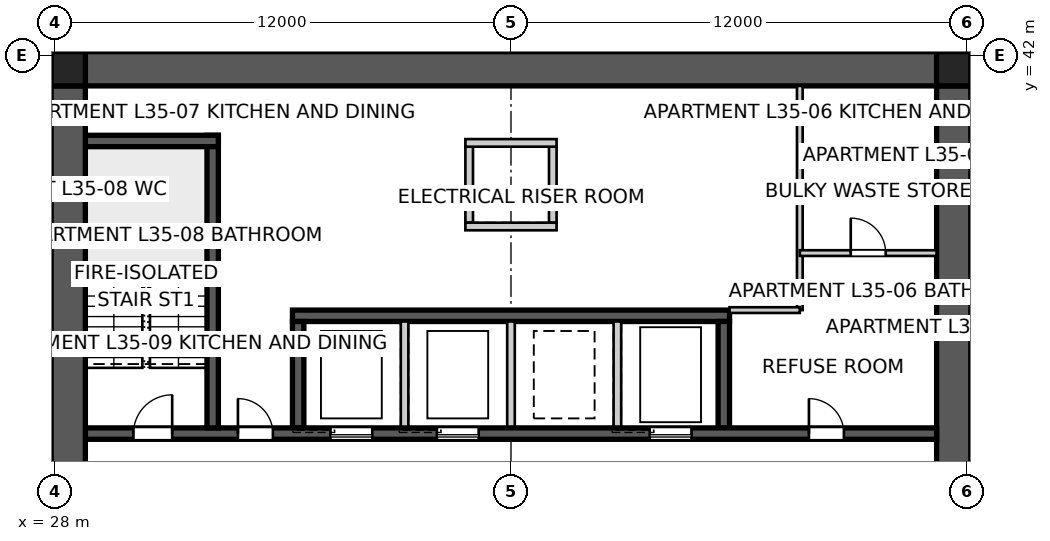
"""IFC4 building model, lengths in metres.
Left out: names, types, materials, properties, quantities, classifications, styles, units other than length and angle.
Written with IfcOpenShell. Run it as: python <this file> out.ifc"""

import sys

from ifc_helpers import new_model, si_unit, direction, frame, frame_2d, origin, origin_2d, place, context, subcontext, project, spatial, polyline, rectangle, outline, extrude, element, fill, save


model = new_model("IFC4")
c1 = context("Model", 3, precision=1e-05, world=origin(), true_north=direction((0.0, 1.0)))
c2 = subcontext(c1, "Body", "Model", "MODEL_VIEW")
j1 = project(units=[si_unit("LENGTHUNIT", "METRE"), si_unit("PLANEANGLEUNIT", "RADIAN")], contexts=[c1])
p1 = place(None, origin())
s1 = spatial("IfcSite", under=j1, at=p1, CompositionType="ELEMENT")
p2 = place(p1, origin())
s2 = spatial("IfcBuilding", under=s1, at=p2, CompositionType="ELEMENT")
p3 = place(p2, frame((0.0, 0.0, 128.6)))
s3 = spatial("IfcBuildingStorey", under=s2, at=p3, CompositionType="ELEMENT", Elevation=128.6)
p4 = place(p3, frame((28.8, 41.65, 0.0), z_axis=(0.0, 0.0, 1.0), x_axis=(1.0, 0.0, 0.0)))
e1 = element("IfcWall", 1, at=p4, inside=s3, PredefinedType="SHEAR", context=c2, shape_type="SweptSolid", body=[
    extrude(outline(polyline([(0.0, -0.45), (22.4, -0.45), (22.4, -0.025), (22.85, -0.025), (22.85, 0.025), (22.4, 0.025), (22.4, 0.45), (0.0, 0.45), (0.0, 0.025), (-0.45, 0.025), (-0.45, -0.025), (0.0, -0.025), (0.0, -0.45)])), origin(), (0.0, 0.0, 1.0), 3.4),
])
p5 = place(p3, frame((51.65, 18.8, 0.0), z_axis=(0.0, 0.0, 1.0), x_axis=(0.0, 1.0, 0.0)))
e2 = element("IfcWall", 2, at=p5, inside=s3, PredefinedType="SHEAR", context=c2, shape_type="SweptSolid", body=[
    extrude(outline(polyline([(0.0, -0.45), (22.4, -0.45), (22.4, -0.025), (22.85, -0.025), (22.85, 0.025), (22.4, 0.025), (22.4, 0.45), (0.0, 0.45), (0.0, 0.025), (-0.45, 0.025), (-0.45, -0.025), (0.0, -0.025), (0.0, -0.45)])), origin(), (0.0, 0.0, 1.0), 3.4),
])
p6 = place(p5, frame((11.14, 0.0, 0.0)))
e3 = element("IfcOpeningElement", 3, at=p6, cuts=e2, PredefinedType="OPENING", context=c2, shape_type="SweptSolid", body=[
    extrude(rectangle(XDim=1.02, YDim=2.4, at=frame_2d((0.51, 1.2))), frame((0.0, 0.46, 0.0), z_axis=(0.0, -1.0, 0.0), x_axis=(1.0, 0.0, 0.0)), (0.0, 0.0, 1.0), 0.92),
])
p7 = place(p3, frame((28.35, 41.2, 0.0), z_axis=(0.0, 0.0, 1.0), x_axis=(0.0, -1.0, 0.0)))
e4 = element("IfcWall", 4, at=p7, inside=s3, PredefinedType="SHEAR", context=c2, shape_type="SweptSolid", body=[
    extrude(outline(polyline([(0.0, -0.45), (22.4, -0.45), (22.4, -0.025), (22.85, -0.025), (22.85, 0.025), (22.4, 0.025), (22.4, 0.45), (0.0, 0.45), (0.0, 0.025), (-0.45, 0.025), (-0.45, -0.025), (0.0, -0.025), (0.0, -0.45)])), origin(), (0.0, 0.0, 1.0), 3.4),
])
p8 = place(p7, frame((11.14, 0.0, 0.0)))
e5 = element("IfcOpeningElement", 5, at=p8, cuts=e4, PredefinedType="OPENING", context=c2, shape_type="SweptSolid", body=[
    extrude(rectangle(XDim=1.02, YDim=2.4, at=frame_2d((0.51, 1.2))), frame((0.0, 0.46, 0.0), z_axis=(0.0, -1.0, 0.0), x_axis=(1.0, 0.0, 0.0)), (0.0, 0.0, 1.0), 0.92),
])
p9 = place(p3, frame((28.8, 32.05, 0.0), z_axis=(0.0, 0.0, 1.0), x_axis=(1.0, 0.0, 0.0)))
e6 = element("IfcWall", 6, at=p9, inside=s3, PredefinedType="SHEAR", context=c2, shape_type="SweptSolid", body=[
    extrude(rectangle(XDim=22.4, YDim=0.3, at=frame_2d((11.2, 0.0))), origin(), (0.0, 0.0, 1.0), 3.4),
])
p10 = place(p9, frame((19.04, 0.0, 0.0)))
e7 = element("IfcOpeningElement", 7, at=p10, cuts=e6, PredefinedType="OPENING", context=c2, shape_type="SweptSolid", body=[
    extrude(rectangle(XDim=0.92, YDim=2.1, at=frame_2d((0.46, 1.05))), frame((0.0, 0.16, 0.0), z_axis=(0.0, -1.0, 0.0), x_axis=(1.0, 0.0, 0.0)), (0.0, 0.0, 1.0), 0.32),
])
p11 = place(p9, frame((1.265, 0.0, 0.0)))
e8 = element("IfcOpeningElement", 8, at=p11, cuts=e6, PredefinedType="OPENING", context=c2, shape_type="SweptSolid", body=[
    extrude(rectangle(XDim=1.02, YDim=2.1, at=frame_2d((0.51, 1.05))), frame((0.0, 0.16, 0.0), z_axis=(0.0, -1.0, 0.0), x_axis=(1.0, 0.0, 0.0)), (0.0, 0.0, 1.0), 0.32),
])
p12 = place(p9, frame((4.015, 0.0, 0.0)))
e9 = element("IfcOpeningElement", 9, at=p12, cuts=e6, PredefinedType="OPENING", context=c2, shape_type="SweptSolid", body=[
    extrude(rectangle(XDim=0.92, YDim=2.1, at=frame_2d((0.46, 1.05))), frame((0.0, 0.16, 0.0), z_axis=(0.0, -1.0, 0.0), x_axis=(1.0, 0.0, 0.0)), (0.0, 0.0, 1.0), 0.32),
])
p13 = place(p9, frame((6.45, 0.0, 0.0)))
e10 = element("IfcOpeningElement", 10, at=p13, cuts=e6, PredefinedType="OPENING", context=c2, shape_type="SweptSolid", body=[
    extrude(rectangle(XDim=1.1, YDim=2.1, at=frame_2d((0.55, 1.05))), frame((0.0, 0.16, 0.0), z_axis=(0.0, -1.0, 0.0), x_axis=(1.0, 0.0, 0.0)), (0.0, 0.0, 1.0), 0.32),
])
p14 = place(p9, frame((9.25, 0.0, 0.0)))
e11 = element("IfcOpeningElement", 11, at=p14, cuts=e6, PredefinedType="OPENING", context=c2, shape_type="SweptSolid", body=[
    extrude(rectangle(XDim=1.1, YDim=2.1, at=frame_2d((0.55, 1.05))), frame((0.0, 0.16, 0.0), z_axis=(0.0, -1.0, 0.0), x_axis=(1.0, 0.0, 0.0)), (0.0, 0.0, 1.0), 0.32),
])
p15 = place(p9, frame((14.85, 0.0, 0.0)))
e12 = element("IfcOpeningElement", 12, at=p15, cuts=e6, PredefinedType="OPENING", context=c2, shape_type="SweptSolid", body=[
    extrude(rectangle(XDim=1.1, YDim=2.1, at=frame_2d((0.55, 1.05))), frame((0.0, 0.16, 0.0), z_axis=(0.0, -1.0, 0.0), x_axis=(1.0, 0.0, 0.0)), (0.0, 0.0, 1.0), 0.32),
])
p16 = place(p3, frame((34.25, 35.15, 0.0), z_axis=(0.0, 0.0, 1.0), x_axis=(1.0, 0.0, 0.0)))
e13 = element("IfcWall", 13, at=p16, inside=s3, PredefinedType="SHEAR", context=c2, shape_type="SweptSolid", body=[
    extrude(rectangle(XDim=11.5, YDim=0.3, at=frame_2d((5.75, 0.0))), origin(), (0.0, 0.0, 1.0), 3.4),
])
p17 = place(p3, frame((34.4, 32.2, 0.0), z_axis=(0.0, 0.0, 1.0), x_axis=(0.0, 1.0, 0.0)))
e14 = element("IfcWall", 14, at=p17, inside=s3, PredefinedType="SHEAR", context=c2, shape_type="SweptSolid", body=[
    extrude(rectangle(XDim=2.8, YDim=0.3, at=frame_2d((1.4, 0.0))), origin(), (0.0, 0.0, 1.0), 3.4),
])
for number, where, z_axis, x_axis in (
    (15, (37.2, 32.2, 0.0), (0.0, 0.0, 1.0), (0.0, 1.0, 0.0)),
    (16, (40.0, 32.2, 0.0), (0.0, 0.0, 1.0), (0.0, 1.0, 0.0)),
    (17, (42.8, 32.2, 0.0), (0.0, 0.0, 1.0), (0.0, 1.0, 0.0)),
):
    element("IfcWall", number, at=place(p3, frame(where, z_axis=z_axis, x_axis=x_axis)), inside=s3, PredefinedType="SOLIDWALL", context=c2, shape_type="SweptSolid", body=[
        extrude(rectangle(XDim=2.8, YDim=0.2, at=frame_2d((1.4, 0.0))), origin(), (0.0, 0.0, 1.0), 3.4),
    ])
p18 = place(p3, frame((45.6, 32.2, 0.0), z_axis=(0.0, 0.0, 1.0), x_axis=(0.0, 1.0, 0.0)))
e18 = element("IfcWall", 18, at=p18, inside=s3, PredefinedType="SHEAR", context=c2, shape_type="SweptSolid", body=[
    extrude(rectangle(XDim=2.8, YDim=0.3, at=frame_2d((1.4, 0.0))), origin(), (0.0, 0.0, 1.0), 3.4),
])
p19 = place(p3, frame((32.15, 32.2, 0.0), z_axis=(0.0, 0.0, 1.0), x_axis=(0.0, 1.0, 0.0)))
e19 = element("IfcWall", 19, at=p19, inside=s3, PredefinedType="SHEAR", context=c2, shape_type="SweptSolid", body=[
    extrude(rectangle(XDim=7.7, YDim=0.3, at=frame_2d((3.85, 0.0))), origin(), (0.0, 0.0, 1.0), 3.4),
])
p20 = place(p3, frame((28.8, 39.75, 0.0), z_axis=(0.0, 0.0, 1.0), x_axis=(1.0, 0.0, 0.0)))
e20 = element("IfcWall", 20, at=p20, inside=s3, PredefinedType="SHEAR", context=c2, shape_type="SweptSolid", body=[
    extrude(rectangle(XDim=3.5, YDim=0.3, at=frame_2d((1.75, 0.0))), origin(), (0.0, 0.0, 1.0), 3.4),
])
for number, where, z_axis, x_axis in (
    (21, (38.9, 37.6, 0.0), (0.0, 0.0, 1.0), (0.0, 1.0, 0.0)),
    (22, (41.1, 37.6, 0.0), (0.0, 0.0, 1.0), (0.0, 1.0, 0.0)),
):
    element("IfcWall", number, at=place(p3, frame(where, z_axis=z_axis, x_axis=x_axis)), inside=s3, PredefinedType="SOLIDWALL", context=c2, shape_type="SweptSolid", body=[
        extrude(rectangle(XDim=2.0, YDim=0.2, at=frame_2d((1.0, 0.0))), origin(), (0.0, 0.0, 1.0), 3.4),
    ])
for number, where, z_axis, x_axis in (
    (23, (38.8, 37.5, 0.0), (0.0, 0.0, 1.0), (1.0, 0.0, 0.0)),
    (24, (38.8, 39.7, 0.0), (0.0, 0.0, 1.0), (1.0, 0.0, 0.0)),
):
    element("IfcWall", number, at=place(p3, frame(where, z_axis=z_axis, x_axis=x_axis)), inside=s3, PredefinedType="SOLIDWALL", context=c2, shape_type="SweptSolid", body=[
        extrude(rectangle(XDim=2.4, YDim=0.2, at=frame_2d((1.2, 0.0))), origin(), (0.0, 0.0, 1.0), 3.4),
    ])
for number, where, z_axis, x_axis in (
    (25, (51.65, 41.65, 0.0), (0.0, 0.0, 1.0), (1.0, 0.0, 0.0)),
    (26, (28.35, 41.65, 0.0), (0.0, 0.0, 1.0), (1.0, 0.0, 0.0)),
):
    element("IfcColumn", number, at=place(p3, frame(where, z_axis=z_axis, x_axis=x_axis)), inside=s3, PredefinedType="COLUMN", context=c2, shape_type="SweptSolid", body=[
        extrude(rectangle(XDim=0.9, YDim=0.9, at=origin_2d()), origin(), (0.0, 0.0, 1.0), 3.4),
    ])
p21 = place(p3, frame((47.6, 41.2, 0.0), z_axis=(0.0, 0.0, 1.0), x_axis=(0.0, -1.0, 0.0)))
e27 = element("IfcWall", 27, at=p21, inside=s3, PredefinedType="SOLIDWALL", context=c2, shape_type="SweptSolid", body=[
    extrude(rectangle(XDim=5.9, YDim=0.15, at=frame_2d((2.95, 0.0))), origin(), (0.0, 0.0, 1.0), 3.25),
])
p22 = place(p3, frame((47.6, 35.3, 0.0), z_axis=(0.0, 0.0, 1.0), x_axis=(-1.0, 0.0, 0.0)))
e28 = element("IfcWall", 28, at=p22, inside=s3, PredefinedType="SOLIDWALL", context=c2, shape_type="SweptSolid", body=[
    extrude(rectangle(XDim=1.85, YDim=0.15, at=frame_2d((0.925, 0.0))), origin(), (0.0, 0.0, 1.0), 3.25),
])
p23 = place(p3, frame((47.6, 36.8, 0.0), z_axis=(0.0, 0.0, 1.0), x_axis=(1.0, 0.0, 0.0)))
e29 = element("IfcWall", 29, at=p23, inside=s3, PredefinedType="SOLIDWALL", context=c2, shape_type="SweptSolid", body=[
    extrude(rectangle(XDim=3.6, YDim=0.15, at=frame_2d((1.8, 0.0))), origin(), (0.0, 0.0, 1.0), 3.25),
])
p24 = place(p23, frame((1.34, 0.0, 0.0)))
e30 = element("IfcOpeningElement", 30, at=p24, cuts=e29, PredefinedType="OPENING", context=c2, shape_type="SweptSolid", body=[
    extrude(rectangle(XDim=0.92, YDim=2.1, at=frame_2d((0.46, 1.05))), frame((0.0, 0.085, 0.0), z_axis=(0.0, -1.0, 0.0), x_axis=(1.0, 0.0, 0.0)), (0.0, 0.0, 1.0), 0.17),
])
p25 = place(p10, origin())
e31 = element("IfcDoor", 31, at=p25, inside=s3, OperationType="SINGLE_SWING_LEFT", PredefinedType="DOOR", context=c2, shape_type="SweptSolid", body=[
    extrude(rectangle(XDim=0.92, YDim=2.1, at=frame_2d((0.46, 1.05))), frame((0.0, 0.025, 0.0), z_axis=(0.0, -1.0, 0.0), x_axis=(1.0, 0.0, 0.0)), (0.0, 0.0, 1.0), 0.05),
])
fill(e7, e31)
p26 = place(p11, origin())
e32 = element("IfcDoor", 32, at=p26, inside=s3, OperationType="SINGLE_SWING_RIGHT", PredefinedType="DOOR", context=c2, shape_type="SweptSolid", body=[
    extrude(rectangle(XDim=1.02, YDim=2.1, at=frame_2d((0.51, 1.05))), frame((0.0, 0.025, 0.0), z_axis=(0.0, -1.0, 0.0), x_axis=(1.0, 0.0, 0.0)), (0.0, 0.0, 1.0), 0.05),
])
fill(e8, e32)
p27 = place(p12, origin())
e33 = element("IfcDoor", 33, at=p27, inside=s3, OperationType="SINGLE_SWING_LEFT", PredefinedType="DOOR", context=c2, shape_type="SweptSolid", body=[
    extrude(rectangle(XDim=0.92, YDim=2.1, at=frame_2d((0.46, 1.05))), frame((0.0, 0.025, 0.0), z_axis=(0.0, -1.0, 0.0), x_axis=(1.0, 0.0, 0.0)), (0.0, 0.0, 1.0), 0.05),
])
fill(e9, e33)
p28 = place(p24, origin())
e34 = element("IfcDoor", 34, at=p28, inside=s3, OperationType="SINGLE_SWING_LEFT", PredefinedType="DOOR", context=c2, shape_type="SweptSolid", body=[
    extrude(rectangle(XDim=0.92, YDim=2.1, at=frame_2d((0.46, 1.05))), frame((0.0, 0.025, 0.0), z_axis=(0.0, -1.0, 0.0), x_axis=(1.0, 0.0, 0.0)), (0.0, 0.0, 1.0), 0.05),
])
fill(e30, e34)
p29 = place(p13, origin())
e35 = element("IfcDoor", 35, at=p29, inside=s3, OperationType="SLIDING_TO_LEFT", PredefinedType="DOOR", context=c2, shape_type="SweptSolid", body=[
    extrude(rectangle(XDim=1.1, YDim=2.1, at=frame_2d((0.55, 1.05))), frame((0.0, 0.025, 0.0), z_axis=(0.0, -1.0, 0.0), x_axis=(1.0, 0.0, 0.0)), (0.0, 0.0, 1.0), 0.05),
])
fill(e10, e35)
p30 = place(p14, origin())
e36 = element("IfcDoor", 36, at=p30, inside=s3, OperationType="SLIDING_TO_LEFT", PredefinedType="DOOR", context=c2, shape_type="SweptSolid", body=[
    extrude(rectangle(XDim=1.1, YDim=2.1, at=frame_2d((0.55, 1.05))), frame((0.0, 0.025, 0.0), z_axis=(0.0, -1.0, 0.0), x_axis=(1.0, 0.0, 0.0)), (0.0, 0.0, 1.0), 0.05),
])
fill(e11, e36)
p31 = place(p15, origin())
e37 = element("IfcDoor", 37, at=p31, inside=s3, OperationType="SLIDING_TO_LEFT", PredefinedType="DOOR", context=c2, shape_type="SweptSolid", body=[
    extrude(rectangle(XDim=1.1, YDim=2.1, at=frame_2d((0.55, 1.05))), frame((0.0, 0.025, 0.0), z_axis=(0.0, -1.0, 0.0), x_axis=(1.0, 0.0, 0.0)), (0.0, 0.0, 1.0), 0.05),
])
fill(e12, e37)
save(model, sys.argv[1])
